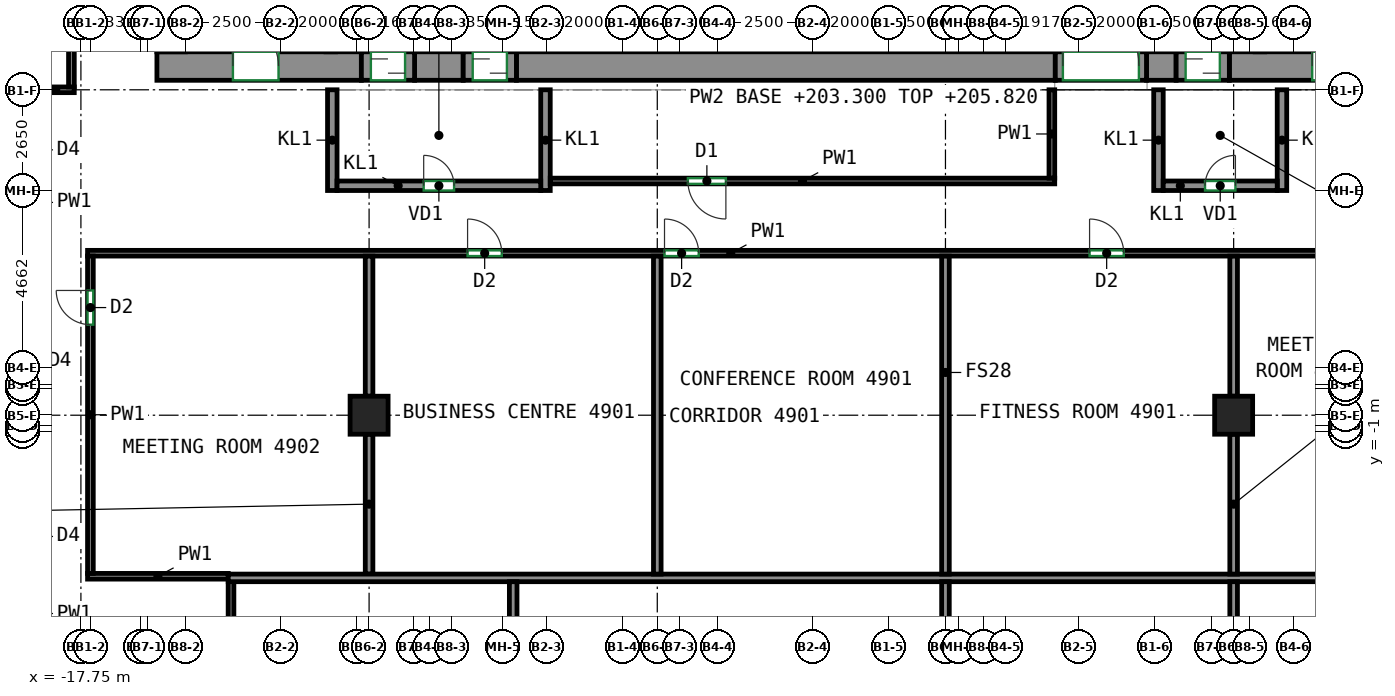
"""IFC4 building model, lengths in metres.
Left out: names, types, materials, properties, quantities, classifications, styles, units other than length and angle.
Written with IfcOpenShell. Run it as: python <this file> out.ifc"""

import sys

from ifc_helpers import new_model, si_unit, direction, frame, frame_2d, origin, origin_2d, place, context, subcontext, project, spatial, rectangle, extrude, source, transform, mapped, element, fill, save


model = new_model("IFC4")
c1 = context("Model", 3, precision=1e-05, world=origin(), true_north=direction((0.0, 1.0)))
c2 = subcontext(c1, "Body", "Model", "MODEL_VIEW")
j1 = project(units=[si_unit("LENGTHUNIT", "METRE"), si_unit("PLANEANGLEUNIT", "RADIAN")], contexts=[c1])
p1 = place(None, origin())
s1 = spatial("IfcSite", under=j1, at=p1, CompositionType="ELEMENT")
p2 = place(p1, origin())
s2 = spatial("IfcBuilding", under=s1, at=p2, CompositionType="ELEMENT")
p3 = place(p2, frame((0.0, 0.0, 203.3)))
s3 = spatial("IfcBuildingStorey", under=s2, at=p3, CompositionType="ELEMENT", Elevation=203.3)
m1 = source(origin(), c2, "Body", "SweptSolid", [
    extrude(rectangle(XDim=1.0, YDim=1.0, at=origin_2d()), origin(), (0.0, 0.0, 1.0), 3.12),
])
for number, where, z_axis, x_axis in (
    (1, (-10.167, -0.562, 0.0), (0.0, 0.0, 1.0), (1.0, 0.0, 0.0)),
    (2, (12.583, -0.562, 0.0), (0.0, 0.0, 1.0), (1.0, 0.0, 0.0)),
):
    element("IfcColumn", number, at=place(p3, frame(where, z_axis=z_axis, x_axis=x_axis)), inside=s3, PredefinedType="COLUMN", context=c2, shape_type="MappedRepresentation", body=[
        mapped(m1, transform((0.0, 0.0, 0.0))),
    ])
m2 = source(origin(), c2, "Body", "SweptSolid", [
    extrude(rectangle(XDim=5.38, YDim=0.75, at=frame_2d((2.69, 0.0))), origin(), (0.0, 0.0, 1.0), 3.12),
])
p4 = place(p3, frame((-15.75, 8.625, 0.0), z_axis=(0.0, 0.0, 1.0), x_axis=(1.0, 0.0, 0.0)))
e3 = element("IfcWall", 3, at=p4, inside=s3, PredefinedType="SHEAR", context=c2, shape_type="MappedRepresentation", body=[
    mapped(m2, transform((0.0, 0.0, 0.0))),
])
p5 = place(p4, frame((2.0, 0.0, 0.0)))
e4 = element("IfcOpeningElement", 4, at=p5, cuts=e3, PredefinedType="OPENING", context=c2, shape_type="SweptSolid", body=[
    extrude(rectangle(XDim=1.2, YDim=2.1, at=frame_2d((0.6, 1.05))), frame((0.0, 0.385, 0.0), z_axis=(0.0, -1.0, 0.0), x_axis=(1.0, 0.0, 0.0)), (0.0, 0.0, 1.0), 0.77),
])
m3 = source(origin(), c2, "Body", "SweptSolid", [
    extrude(rectangle(XDim=1.28, YDim=0.75, at=frame_2d((0.64, 0.0))), origin(), (0.0, 0.0, 1.0), 3.12),
])
p6 = place(p3, frame((-8.97, 8.625, 0.0), z_axis=(0.0, 0.0, 1.0), x_axis=(1.0, 0.0, 0.0)))
e5 = element("IfcWall", 5, at=p6, inside=s3, PredefinedType="SHEAR", context=c2, shape_type="MappedRepresentation", body=[
    mapped(m3, transform((0.0, 0.0, 0.0))),
])
m4 = source(origin(), c2, "Body", "SweptSolid", [
    extrude(rectangle(XDim=14.18, YDim=0.75, at=frame_2d((7.09, 0.0))), origin(), (0.0, 0.0, 1.0), 3.12),
])
p7 = place(p3, frame((-6.29, 8.625, 0.0), z_axis=(0.0, 0.0, 1.0), x_axis=(1.0, 0.0, 0.0)))
e6 = element("IfcWall", 6, at=p7, inside=s3, PredefinedType="SHEAR", context=c2, shape_type="MappedRepresentation", body=[
    mapped(m4, transform((0.0, 0.0, 0.0))),
])
m5 = source(origin(), c2, "Body", "SweptSolid", [
    extrude(rectangle(XDim=0.78, YDim=0.75, at=frame_2d((0.39, 0.0))), origin(), (0.0, 0.0, 1.0), 3.12),
])
p8 = place(p3, frame((10.29, 8.625, 0.0), z_axis=(0.0, 0.0, 1.0), x_axis=(1.0, 0.0, 0.0)))
e7 = element("IfcWall", 7, at=p8, inside=s3, PredefinedType="SHEAR", context=c2, shape_type="MappedRepresentation", body=[
    mapped(m5, transform((0.0, 0.0, 0.0))),
])
m6 = source(origin(), c2, "Body", "SweptSolid", [
    extrude(rectangle(XDim=5.38, YDim=0.75, at=frame_2d((2.69, 0.0))), origin(), (0.0, 0.0, 1.0), 3.12),
])
p9 = place(p3, frame((12.47, 8.625, 0.0), z_axis=(0.0, 0.0, 1.0), x_axis=(1.0, 0.0, 0.0)))
e8 = element("IfcWall", 8, at=p9, inside=s3, PredefinedType="SHEAR", context=c2, shape_type="MappedRepresentation", body=[
    mapped(m6, transform((0.0, 0.0, 0.0))),
])
p10 = place(p9, frame((2.18, 0.0, 0.0)))
e9 = element("IfcOpeningElement", 9, at=p10, cuts=e8, PredefinedType="OPENING", context=c2, shape_type="SweptSolid", body=[
    extrude(rectangle(XDim=1.2, YDim=2.1, at=frame_2d((0.6, 1.05))), frame((0.0, 0.385, 0.0), z_axis=(0.0, -1.0, 0.0), x_axis=(1.0, 0.0, 0.0)), (0.0, 0.0, 1.0), 0.77),
])
m7 = source(origin(), c2, "Body", "SweptSolid", [
    extrude(rectangle(XDim=2.65, YDim=0.25, at=frame_2d((1.325, 0.0))), origin(), (0.0, 0.0, 1.0), 3.12),
])
for number, where, z_axis, x_axis in (
    (10, (-11.135, 5.35, 0.0), (0.0, 0.0, 1.0), (0.0, 1.0, 0.0)),
    (11, (-5.525, 5.35, 0.0), (0.0, 0.0, 1.0), (0.0, 1.0, 0.0)),
):
    element("IfcWall", number, at=place(p3, frame(where, z_axis=z_axis, x_axis=x_axis)), inside=s3, PredefinedType="PARTITIONING", context=c2, shape_type="MappedRepresentation", body=[
        mapped(m7, transform((0.0, 0.0, 0.0))),
    ])
m8 = source(origin(), c2, "Body", "SweptSolid", [
    extrude(rectangle(XDim=5.36, YDim=0.25, at=frame_2d((2.68, 0.0))), origin(), (0.0, 0.0, 1.0), 3.12),
])
p11 = place(p3, frame((-11.01, 5.475, 0.0), z_axis=(0.0, 0.0, 1.0), x_axis=(1.0, 0.0, 0.0)))
e12 = element("IfcWall", 12, at=p11, inside=s3, PredefinedType="PARTITIONING", context=c2, shape_type="MappedRepresentation", body=[
    mapped(m8, transform((0.0, 0.0, 0.0))),
])
p12 = place(p11, frame((2.28, 0.0, 0.0)))
e13 = element("IfcOpeningElement", 13, at=p12, cuts=e12, PredefinedType="OPENING", context=c2, shape_type="SweptSolid", body=[
    extrude(rectangle(XDim=0.8, YDim=2.0, at=frame_2d((0.4, 1.0))), frame((0.0, 0.135, 0.0), z_axis=(0.0, -1.0, 0.0), x_axis=(1.0, 0.0, 0.0)), (0.0, 0.0, 1.0), 0.27),
])
for number, where, z_axis, x_axis in (
    (14, (10.605, 5.35, 0.0), (0.0, 0.0, 1.0), (0.0, 1.0, 0.0)),
    (15, (13.855, 5.35, 0.0), (0.0, 0.0, 1.0), (0.0, 1.0, 0.0)),
):
    element("IfcWall", number, at=place(p3, frame(where, z_axis=z_axis, x_axis=x_axis)), inside=s3, PredefinedType="PARTITIONING", context=c2, shape_type="MappedRepresentation", body=[
        mapped(m7, transform((0.0, 0.0, 0.0))),
    ])
m9 = source(origin(), c2, "Body", "SweptSolid", [
    extrude(rectangle(XDim=3.0, YDim=0.25, at=frame_2d((1.5, 0.0))), origin(), (0.0, 0.0, 1.0), 3.12),
])
p13 = place(p3, frame((10.73, 5.475, 0.0), z_axis=(0.0, 0.0, 1.0), x_axis=(1.0, 0.0, 0.0)))
e16 = element("IfcWall", 16, at=p13, inside=s3, PredefinedType="PARTITIONING", context=c2, shape_type="MappedRepresentation", body=[
    mapped(m9, transform((0.0, 0.0, 0.0))),
])
p14 = place(p13, frame((1.1, 0.0, 0.0)))
e17 = element("IfcOpeningElement", 17, at=p14, cuts=e16, PredefinedType="OPENING", context=c2, shape_type="SweptSolid", body=[
    extrude(rectangle(XDim=0.8, YDim=2.0, at=frame_2d((0.4, 1.0))), frame((0.0, 0.135, 0.0), z_axis=(0.0, -1.0, 0.0), x_axis=(1.0, 0.0, 0.0)), (0.0, 0.0, 1.0), 0.27),
])
m10 = source(origin(), c2, "Body", "SweptSolid", [
    extrude(rectangle(XDim=1.4, YDim=0.75, at=frame_2d((0.7, 0.0))), origin(), (0.0, 0.0, 1.0), 2.7),
])
p15 = place(p3, frame((-10.37, 8.625, 0.0), z_axis=(0.0, 0.0, 1.0), x_axis=(1.0, 0.0, 0.0)))
e18 = element("IfcWall", 18, at=p15, inside=s3, PredefinedType="PARTITIONING", context=c2, shape_type="MappedRepresentation", body=[
    mapped(m10, transform((0.0, 0.0, 0.0))),
])
p16 = place(p15, frame((0.25, 0.0, 0.0)))
e19 = element("IfcOpeningElement", 19, at=p16, cuts=e18, PredefinedType="OPENING", context=c2, shape_type="SweptSolid", body=[
    extrude(rectangle(XDim=0.9, YDim=2.1, at=frame_2d((0.45, 1.05))), frame((0.0, 0.385, 0.0), z_axis=(0.0, -1.0, 0.0), x_axis=(1.0, 0.0, 0.0)), (0.0, 0.0, 1.0), 0.77),
])
m11 = source(origin(), c2, "Body", "SweptSolid", [
    extrude(rectangle(XDim=1.4, YDim=0.75, at=frame_2d((0.7, 0.0))), origin(), (0.0, 0.0, 1.0), 2.7),
])
p17 = place(p3, frame((-7.69, 8.625, 0.0), z_axis=(0.0, 0.0, 1.0), x_axis=(1.0, 0.0, 0.0)))
e20 = element("IfcWall", 20, at=p17, inside=s3, PredefinedType="PARTITIONING", context=c2, shape_type="MappedRepresentation", body=[
    mapped(m11, transform((0.0, 0.0, 0.0))),
])
p18 = place(p17, frame((0.25, 0.0, 0.0)))
e21 = element("IfcOpeningElement", 21, at=p18, cuts=e20, PredefinedType="OPENING", context=c2, shape_type="SweptSolid", body=[
    extrude(rectangle(XDim=0.9, YDim=2.1, at=frame_2d((0.45, 1.05))), frame((0.0, 0.385, 0.0), z_axis=(0.0, -1.0, 0.0), x_axis=(1.0, 0.0, 0.0)), (0.0, 0.0, 1.0), 0.77),
])
m12 = source(origin(), c2, "Body", "SweptSolid", [
    extrude(rectangle(XDim=2.4, YDim=0.75, at=frame_2d((1.2, 0.0))), origin(), (0.0, 0.0, 1.0), 2.7),
])
p19 = place(p3, frame((7.89, 8.625, 0.0), z_axis=(0.0, 0.0, 1.0), x_axis=(1.0, 0.0, 0.0)))
e22 = element("IfcWall", 22, at=p19, inside=s3, PredefinedType="PARTITIONING", context=c2, shape_type="MappedRepresentation", body=[
    mapped(m12, transform((0.0, 0.0, 0.0))),
])
p20 = place(p19, frame((0.2, 0.0, 0.0)))
e23 = element("IfcOpeningElement", 23, at=p20, cuts=e22, PredefinedType="OPENING", context=c2, shape_type="SweptSolid", body=[
    extrude(rectangle(XDim=2.0, YDim=2.1, at=frame_2d((1.0, 1.05))), frame((0.0, 0.385, 0.0), z_axis=(0.0, -1.0, 0.0), x_axis=(1.0, 0.0, 0.0)), (0.0, 0.0, 1.0), 0.77),
])
p21 = place(p3, frame((11.07, 8.625, 0.0), z_axis=(0.0, 0.0, 1.0), x_axis=(1.0, 0.0, 0.0)))
e24 = element("IfcWall", 24, at=p21, inside=s3, PredefinedType="PARTITIONING", context=c2, shape_type="MappedRepresentation", body=[
    mapped(m11, transform((0.0, 0.0, 0.0))),
])
p22 = place(p21, frame((0.25, 0.0, 0.0)))
e25 = element("IfcOpeningElement", 25, at=p22, cuts=e24, PredefinedType="OPENING", context=c2, shape_type="SweptSolid", body=[
    extrude(rectangle(XDim=0.9, YDim=2.1, at=frame_2d((0.45, 1.05))), frame((0.0, 0.385, 0.0), z_axis=(0.0, -1.0, 0.0), x_axis=(1.0, 0.0, 0.0)), (0.0, 0.0, 1.0), 0.77),
])
p23 = place(p3, frame((-17.925, 8.0, 0.0), z_axis=(0.0, 0.0, 1.0), x_axis=(-1.0, 0.0, 0.0)))
e26 = element("IfcWall", 26, at=p23, inside=s3, PredefinedType="PARTITIONING", context=c2, shape_type="SweptSolid", body=[
    extrude(rectangle(XDim=0.976, YDim=0.15, at=frame_2d((0.488, 0.0))), origin(), (0.0, 0.0, 1.0), 3.12),
])
p24 = place(p3, frame((-18.0, 21.9, 0.0), z_axis=(0.0, 0.0, 1.0), x_axis=(0.0, -1.0, 0.0)))
e27 = element("IfcWall", 27, at=p24, inside=s3, PredefinedType="PARTITIONING", context=c2, shape_type="SweptSolid", body=[
    extrude(rectangle(XDim=13.825, YDim=0.15, at=frame_2d((6.913, 0.0))), origin(), (0.0, 0.0, 1.0), 3.12),
])
p25 = place(p24, frame((10.721, 0.0, 0.0)))
e28 = element("IfcOpeningElement", 28, at=p25, cuts=e27, PredefinedType="OPENING", context=c2, shape_type="SweptSolid", body=[
    extrude(rectangle(XDim=1.0, YDim=2.1, at=frame_2d((0.5, 1.05))), frame((0.0, 0.085, 0.0), z_axis=(0.0, -1.0, 0.0), x_axis=(1.0, 0.0, 0.0)), (0.0, 0.0, 1.0), 0.17),
])
p26 = place(p3, frame((7.875, 5.6, 0.0), z_axis=(0.0, 0.0, 1.0), x_axis=(-1.0, 0.0, 0.0)))
e29 = element("IfcWall", 29, at=p26, inside=s3, PredefinedType="PARTITIONING", context=c2, shape_type="SweptSolid", body=[
    extrude(rectangle(XDim=13.275, YDim=0.15, at=frame_2d((6.637, 0.0))), origin(), (0.0, 0.0, 1.0), 3.12),
])
p27 = place(p26, frame((8.653, 0.0, 0.0)))
e30 = element("IfcOpeningElement", 30, at=p27, cuts=e29, PredefinedType="OPENING", context=c2, shape_type="SweptSolid", body=[
    extrude(rectangle(XDim=1.0, YDim=2.1, at=frame_2d((0.5, 1.05))), frame((0.0, 0.085, 0.0), z_axis=(0.0, -1.0, 0.0), x_axis=(1.0, 0.0, 0.0)), (0.0, 0.0, 1.0), 0.17),
])
p28 = place(p3, frame((7.8, 8.0, 0.0), z_axis=(0.0, 0.0, 1.0), x_axis=(0.0, -1.0, 0.0)))
e31 = element("IfcWall", 31, at=p28, inside=s3, PredefinedType="PARTITIONING", context=c2, shape_type="SweptSolid", body=[
    extrude(rectangle(XDim=2.325, YDim=0.15, at=frame_2d((1.163, 0.0))), origin(), (0.0, 0.0, 1.0), 3.12),
])
p29 = place(p3, frame((-17.575, -4.8, 0.0), z_axis=(0.0, 0.0, 1.0), x_axis=(1.0, 0.0, 0.0)))
e32 = element("IfcWall", 32, at=p29, inside=s3, PredefinedType="PARTITIONING", context=c2, shape_type="SweptSolid", body=[
    extrude(rectangle(XDim=3.702, YDim=0.15, at=frame_2d((1.851, 0.0))), origin(), (0.0, 0.0, 1.0), 3.12),
])
p30 = place(p3, frame((-17.575, 3.7, 0.0), z_axis=(0.0, 0.0, 1.0), x_axis=(1.0, 0.0, 0.0)))
e33 = element("IfcWall", 33, at=p30, inside=s3, PredefinedType="PARTITIONING", context=c2, shape_type="SweptSolid", body=[
    extrude(rectangle(XDim=33.85, YDim=0.15, at=frame_2d((16.925, 0.0))), origin(), (0.0, 0.0, 1.0), 3.12),
])
p31 = place(p30, frame((10.0, 0.0, 0.0)))
e34 = element("IfcOpeningElement", 34, at=p31, cuts=e33, PredefinedType="OPENING", context=c2, shape_type="SweptSolid", body=[
    extrude(rectangle(XDim=0.9, YDim=2.1, at=frame_2d((0.45, 1.05))), frame((0.0, 0.085, 0.0), z_axis=(0.0, -1.0, 0.0), x_axis=(1.0, 0.0, 0.0)), (0.0, 0.0, 1.0), 0.17),
])
p32 = place(p30, frame((15.182, 0.0, 0.0)))
e35 = element("IfcOpeningElement", 35, at=p32, cuts=e33, PredefinedType="OPENING", context=c2, shape_type="SweptSolid", body=[
    extrude(rectangle(XDim=0.9, YDim=2.1, at=frame_2d((0.45, 1.05))), frame((0.0, 0.085, 0.0), z_axis=(0.0, -1.0, 0.0), x_axis=(1.0, 0.0, 0.0)), (0.0, 0.0, 1.0), 0.17),
])
p33 = place(p30, frame((26.367, 0.0, 0.0)))
e36 = element("IfcOpeningElement", 36, at=p33, cuts=e33, PredefinedType="OPENING", context=c2, shape_type="SweptSolid", body=[
    extrude(rectangle(XDim=0.9, YDim=2.1, at=frame_2d((0.45, 1.05))), frame((0.0, 0.085, 0.0), z_axis=(0.0, -1.0, 0.0), x_axis=(1.0, 0.0, 0.0)), (0.0, 0.0, 1.0), 0.17),
])
p34 = place(p3, frame((-17.5, -4.725, 0.0), z_axis=(0.0, 0.0, 1.0), x_axis=(0.0, 1.0, 0.0)))
e37 = element("IfcWall", 37, at=p34, inside=s3, PredefinedType="PARTITIONING", context=c2, shape_type="SweptSolid", body=[
    extrude(rectangle(XDim=8.35, YDim=0.15, at=frame_2d((4.175, 0.0))), origin(), (0.0, 0.0, 1.0), 3.12),
])
p35 = place(p34, frame((6.545, 0.0, 0.0)))
e38 = element("IfcOpeningElement", 38, at=p35, cuts=e37, PredefinedType="OPENING", context=c2, shape_type="SweptSolid", body=[
    extrude(rectangle(XDim=0.9, YDim=2.1, at=frame_2d((0.45, 1.05))), frame((0.0, 0.085, 0.0), z_axis=(0.0, -1.0, 0.0), x_axis=(1.0, 0.0, 0.0)), (0.0, 0.0, 1.0), 0.17),
])
p36 = place(p3, frame((-13.8, -7.75, 0.0), z_axis=(0.0, 0.0, 1.0), x_axis=(0.0, 1.0, 0.0)))
e39 = element("IfcWall", 39, at=p36, inside=s3, PredefinedType="PARTITIONING", context=c2, shape_type="SweptSolid", body=[
    extrude(rectangle(XDim=2.817, YDim=0.15, at=frame_2d((1.408, 0.0))), origin(), (0.0, 0.0, 1.0), 3.12),
])
p37 = place(p3, frame((-10.167, -0.062, 0.0), z_axis=(0.0, 0.0, 1.0), x_axis=(0.0, 1.0, 0.0)))
e40 = element("IfcWall", 40, at=p37, inside=s3, PredefinedType="PARTITIONING", context=c2, shape_type="SweptSolid", body=[
    extrude(rectangle(XDim=3.685, YDim=0.2, at=frame_2d((1.843, 0.0))), origin(), (0.0, 0.0, 1.0), 3.12),
])
p38 = place(p3, frame((-10.167, -4.743, 0.0), z_axis=(0.0, 0.0, 1.0), x_axis=(0.0, 1.0, 0.0)))
e41 = element("IfcWall", 41, at=p38, inside=s3, PredefinedType="PARTITIONING", context=c2, shape_type="SweptSolid", body=[
    extrude(rectangle(XDim=3.681, YDim=0.2, at=frame_2d((1.84, 0.0))), origin(), (0.0, 0.0, 1.0), 2.52),
])
p39 = place(p3, frame((-13.873, -4.843, 0.0), z_axis=(0.0, 0.0, 1.0), x_axis=(1.0, 0.0, 0.0)))
e42 = element("IfcWall", 42, at=p39, inside=s3, PredefinedType="PARTITIONING", context=c2, shape_type="SweptSolid", body=[
    extrude(rectangle(XDim=30.146, YDim=0.2, at=frame_2d((15.073, 0.0))), origin(), (0.0, 0.0, 1.0), 3.12),
])
for number, where, z_axis, x_axis in (
    (43, (-2.583, -4.743, 0.0), (0.0, 0.0, 1.0), (0.0, 1.0, 0.0)),
    (44, (5.0, -4.743, 0.0), (0.0, 0.0, 1.0), (0.0, 1.0, 0.0)),
):
    element("IfcWall", number, at=place(p3, frame(where, z_axis=z_axis, x_axis=x_axis)), inside=s3, PredefinedType="PARTITIONING", context=c2, shape_type="SweptSolid", body=[
        extrude(rectangle(XDim=8.366, YDim=0.2, at=frame_2d((4.183, 0.0))), origin(), (0.0, 0.0, 1.0), 3.12),
    ])
p40 = place(p3, frame((12.583, -0.062, 0.0), z_axis=(0.0, 0.0, 1.0), x_axis=(0.0, 1.0, 0.0)))
e45 = element("IfcWall", 45, at=p40, inside=s3, PredefinedType="PARTITIONING", context=c2, shape_type="SweptSolid", body=[
    extrude(rectangle(XDim=3.685, YDim=0.2, at=frame_2d((1.843, 0.0))), origin(), (0.0, 0.0, 1.0), 3.12),
])
p41 = place(p3, frame((12.583, -4.743, 0.0), z_axis=(0.0, 0.0, 1.0), x_axis=(0.0, 1.0, 0.0)))
e46 = element("IfcWall", 46, at=p41, inside=s3, PredefinedType="PARTITIONING", context=c2, shape_type="SweptSolid", body=[
    extrude(rectangle(XDim=3.681, YDim=0.2, at=frame_2d((1.84, 0.0))), origin(), (0.0, 0.0, 1.0), 2.52),
])
for number, where, z_axis, x_axis in (
    (47, (-6.375, -15.423, 0.0), (0.0, 0.0, 1.0), (0.0, 1.0, 0.0)),
    (48, (5.0, -15.423, 0.0), (0.0, 0.0, 1.0), (0.0, 1.0, 0.0)),
):
    element("IfcWall", number, at=place(p3, frame(where, z_axis=z_axis, x_axis=x_axis)), inside=s3, PredefinedType="PARTITIONING", context=c2, shape_type="SweptSolid", body=[
        extrude(rectangle(XDim=10.48, YDim=0.2, at=frame_2d((5.24, 0.0))), origin(), (0.0, 0.0, 1.0), 3.12),
    ])
p42 = place(p3, frame((12.583, -8.625, 0.0), z_axis=(0.0, 0.0, 1.0), x_axis=(0.0, 1.0, 0.0)))
e49 = element("IfcWall", 49, at=p42, inside=s3, PredefinedType="PARTITIONING", context=c2, shape_type="SweptSolid", body=[
    extrude(rectangle(XDim=3.682, YDim=0.2, at=frame_2d((1.841, 0.0))), origin(), (0.0, 0.0, 1.0), 2.52),
])
p43 = place(p20, origin())
e50 = element("IfcDoor", 50, at=p43, inside=s3, OperationType="DOUBLE_DOOR_SINGLE_SWING", PredefinedType="DOOR", context=c2, shape_type="SweptSolid", body=[
    extrude(rectangle(XDim=2.0, YDim=2.1, at=frame_2d((1.0, 1.05))), frame((0.0, 0.28, 0.0), z_axis=(0.0, -1.0, 0.0), x_axis=(1.0, 0.0, 0.0)), (0.0, 0.0, 1.0), 0.05),
])
fill(e23, e50)
p44 = place(p12, origin())
e51 = element("IfcDoor", 51, at=p44, inside=s3, OperationType="SINGLE_SWING_LEFT", PredefinedType="DOOR", context=c2, shape_type="SweptSolid", body=[
    extrude(rectangle(XDim=0.8, YDim=2.0, at=frame_2d((0.4, 1.0))), frame((0.0, 0.025, 0.0), z_axis=(0.0, -1.0, 0.0), x_axis=(1.0, 0.0, 0.0)), (0.0, 0.0, 1.0), 0.05),
])
fill(e13, e51)
p45 = place(p14, origin())
e52 = element("IfcDoor", 52, at=p45, inside=s3, OperationType="SINGLE_SWING_RIGHT", PredefinedType="DOOR", context=c2, shape_type="SweptSolid", body=[
    extrude(rectangle(XDim=0.8, YDim=2.0, at=frame_2d((0.4, 1.0))), frame((0.0, 0.025, 0.0), z_axis=(0.0, -1.0, 0.0), x_axis=(1.0, 0.0, 0.0)), (0.0, 0.0, 1.0), 0.05),
])
fill(e17, e52)
p46 = place(p16, origin())
e53 = element("IfcDoor", 53, at=p46, inside=s3, OperationType="SLIDING_TO_LEFT", PredefinedType="DOOR", context=c2, shape_type="SweptSolid", body=[
    extrude(rectangle(XDim=0.9, YDim=2.1, at=frame_2d((0.45, 1.05))), frame((0.0, 0.28, 0.0), z_axis=(0.0, -1.0, 0.0), x_axis=(1.0, 0.0, 0.0)), (0.0, 0.0, 1.0), 0.05),
])
fill(e19, e53)
p47 = place(p18, origin())
e54 = element("IfcDoor", 54, at=p47, inside=s3, OperationType="SLIDING_TO_RIGHT", PredefinedType="DOOR", context=c2, shape_type="SweptSolid", body=[
    extrude(rectangle(XDim=0.9, YDim=2.1, at=frame_2d((0.45, 1.05))), frame((0.0, 0.28, 0.0), z_axis=(0.0, -1.0, 0.0), x_axis=(1.0, 0.0, 0.0)), (0.0, 0.0, 1.0), 0.05),
])
fill(e21, e54)
p48 = place(p22, origin())
e55 = element("IfcDoor", 55, at=p48, inside=s3, OperationType="SLIDING_TO_LEFT", PredefinedType="DOOR", context=c2, shape_type="SweptSolid", body=[
    extrude(rectangle(XDim=0.9, YDim=2.1, at=frame_2d((0.45, 1.05))), frame((0.0, 0.28, 0.0), z_axis=(0.0, -1.0, 0.0), x_axis=(1.0, 0.0, 0.0)), (0.0, 0.0, 1.0), 0.05),
])
fill(e25, e55)
p49 = place(p5, origin())
e56 = element("IfcDoor", 56, at=p49, inside=s3, OperationType="DOUBLE_DOOR_SINGLE_SWING", PredefinedType="DOOR", context=c2, shape_type="SweptSolid", body=[
    extrude(rectangle(XDim=1.2, YDim=2.1, at=frame_2d((0.6, 1.05))), frame((0.0, 0.28, 0.0), z_axis=(0.0, -1.0, 0.0), x_axis=(1.0, 0.0, 0.0)), (0.0, 0.0, 1.0), 0.05),
])
fill(e4, e56)
p50 = place(p10, origin())
e57 = element("IfcDoor", 57, at=p50, inside=s3, OperationType="DOUBLE_DOOR_SINGLE_SWING", PredefinedType="DOOR", context=c2, shape_type="SweptSolid", body=[
    extrude(rectangle(XDim=1.2, YDim=2.1, at=frame_2d((0.6, 1.05))), frame((0.0, 0.28, 0.0), z_axis=(0.0, -1.0, 0.0), x_axis=(1.0, 0.0, 0.0)), (0.0, 0.0, 1.0), 0.05),
])
fill(e9, e57)
p51 = place(p35, origin())
e58 = element("IfcDoor", 58, at=p51, inside=s3, OperationType="SINGLE_SWING_RIGHT", PredefinedType="DOOR", context=c2, shape_type="SweptSolid", body=[
    extrude(rectangle(XDim=0.9, YDim=2.1, at=frame_2d((0.45, 1.05))), frame((0.0, 0.025, 0.0), z_axis=(0.0, -1.0, 0.0), x_axis=(1.0, 0.0, 0.0)), (0.0, 0.0, 1.0), 0.05),
])
fill(e38, e58)
p52 = place(p31, origin())
e59 = element("IfcDoor", 59, at=p52, inside=s3, OperationType="SINGLE_SWING_LEFT", PredefinedType="DOOR", context=c2, shape_type="SweptSolid", body=[
    extrude(rectangle(XDim=0.9, YDim=2.1, at=frame_2d((0.45, 1.05))), frame((0.0, 0.025, 0.0), z_axis=(0.0, -1.0, 0.0), x_axis=(1.0, 0.0, 0.0)), (0.0, 0.0, 1.0), 0.05),
])
fill(e34, e59)
p53 = place(p32, origin())
e60 = element("IfcDoor", 60, at=p53, inside=s3, OperationType="SINGLE_SWING_LEFT", PredefinedType="DOOR", context=c2, shape_type="SweptSolid", body=[
    extrude(rectangle(XDim=0.9, YDim=2.1, at=frame_2d((0.45, 1.05))), frame((0.0, 0.025, 0.0), z_axis=(0.0, -1.0, 0.0), x_axis=(1.0, 0.0, 0.0)), (0.0, 0.0, 1.0), 0.05),
])
fill(e35, e60)
p54 = place(p33, origin())
e61 = element("IfcDoor", 61, at=p54, inside=s3, OperationType="SINGLE_SWING_LEFT", PredefinedType="DOOR", context=c2, shape_type="SweptSolid", body=[
    extrude(rectangle(XDim=0.9, YDim=2.1, at=frame_2d((0.45, 1.05))), frame((0.0, 0.025, 0.0), z_axis=(0.0, -1.0, 0.0), x_axis=(1.0, 0.0, 0.0)), (0.0, 0.0, 1.0), 0.05),
])
fill(e36, e61)
p55 = place(p27, origin())
e62 = element("IfcDoor", 62, at=p55, inside=s3, OperationType="SINGLE_SWING_LEFT", PredefinedType="DOOR", context=c2, shape_type="SweptSolid", body=[
    extrude(rectangle(XDim=1.0, YDim=2.1, at=frame_2d((0.5, 1.05))), frame((0.0, 0.025, 0.0), z_axis=(0.0, -1.0, 0.0), x_axis=(1.0, 0.0, 0.0)), (0.0, 0.0, 1.0), 0.05),
])
fill(e30, e62)
save(model, sys.argv[1])
